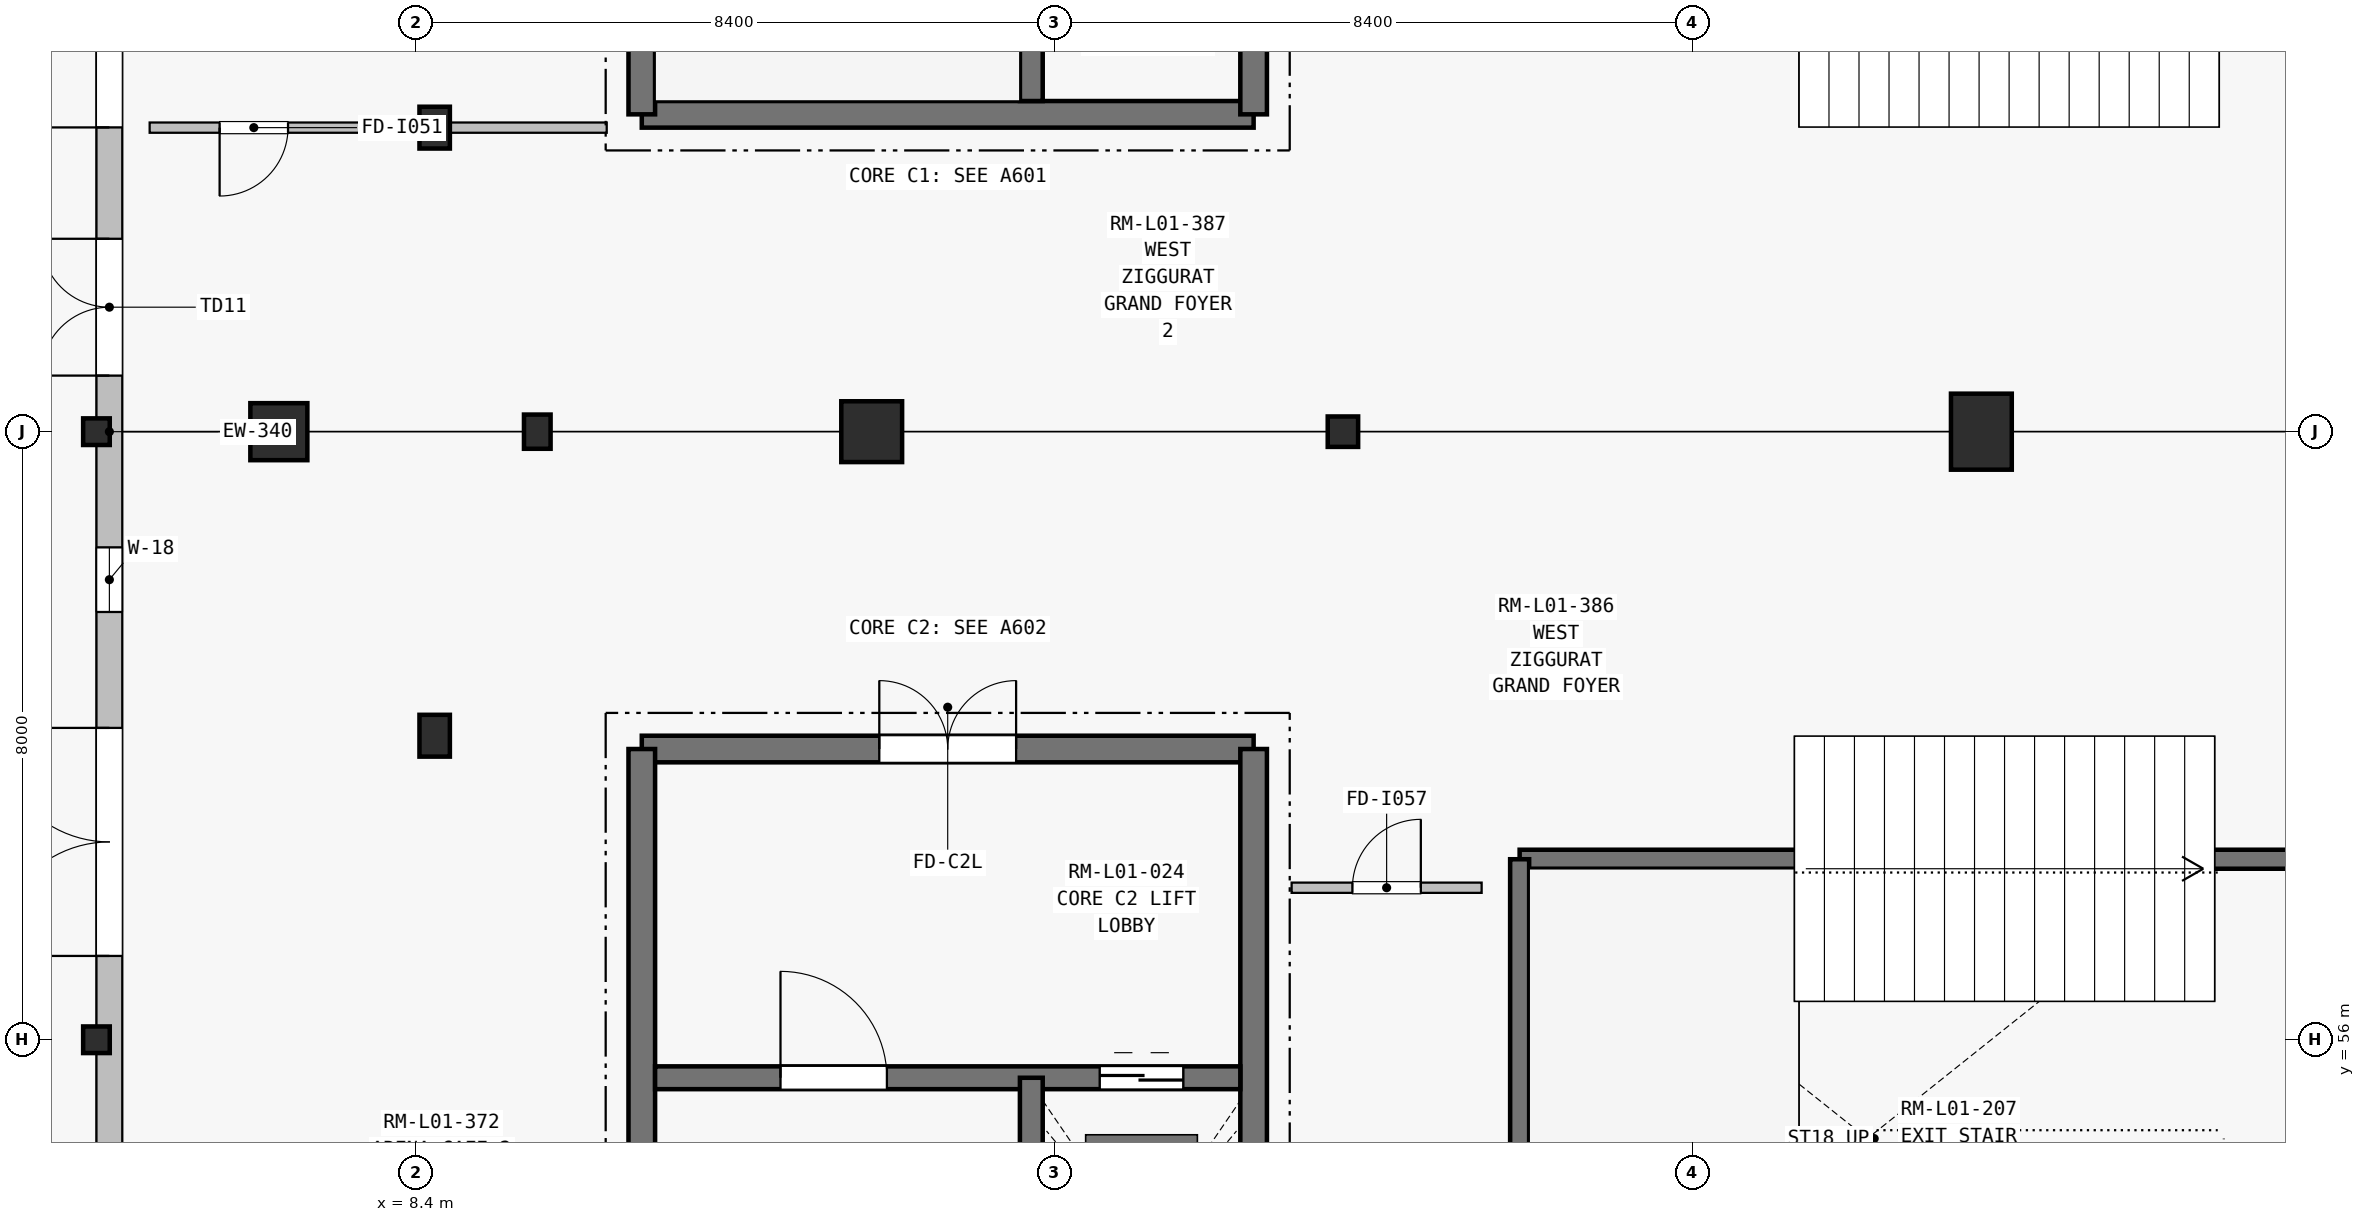
"""IFC4 building model, lengths in metres.
Left out: names, types, materials, properties, quantities, classifications, styles, units other than length and angle.
Written with IfcOpenShell. Run it as: python <this file> out.ifc"""

import sys

from ifc_helpers import new_model, si_unit, direction, frame, frame_2d, origin, origin_2d, place, context, subcontext, project, spatial, rectangle, i_section, extrude, element, fill, save


model = new_model("IFC4")
c1 = context("Model", 3, precision=1e-05, world=origin(), true_north=direction((0.0, 1.0)))
c2 = subcontext(c1, "Body", "Model", "MODEL_VIEW")
j1 = project(units=[si_unit("LENGTHUNIT", "METRE"), si_unit("PLANEANGLEUNIT", "RADIAN")], contexts=[c1])
p1 = place(None, origin())
s1 = spatial("IfcSite", under=j1, at=p1, CompositionType="ELEMENT")
p2 = place(p1, origin())
s2 = spatial("IfcBuilding", under=s1, at=p2, CompositionType="ELEMENT")
p3 = place(p2, frame((0.0, 0.0, 5.4)))
s3 = spatial("IfcBuildingStorey", under=s2, at=p3, CompositionType="ELEMENT", Elevation=5.4)
p4 = place(p3, frame((29.0, 64.0, 0.0), z_axis=(0.0, 0.0, 1.0), x_axis=(-1.0, 0.0, 0.0)))
e1 = element("IfcColumn", 1, at=p4, inside=s3, PredefinedType="COLUMN", context=c2, shape_type="SweptSolid", body=[
    extrude(rectangle(XDim=0.8, YDim=1.0, at=origin_2d()), origin(), (0.0, 0.0, 1.0), 4.5),
])
p5 = place(p3, frame((20.6, 64.0, 0.0), z_axis=(0.0, 0.0, 1.0), x_axis=(-1.0, 0.0, 0.0)))
e2 = element("IfcColumn", 2, at=p5, inside=s3, PredefinedType="COLUMN", context=c2, shape_type="SweptSolid", body=[
    extrude(i_section(OverallWidth=0.4, OverallDepth=0.4, WebThickness=0.018, FlangeThickness=0.032, at=origin_2d()), origin(), (0.0, 0.0, 1.0), 4.5),
])
p6 = place(p3, frame((14.4, 64.0, 0.0), z_axis=(0.0, 0.0, 1.0), x_axis=(-1.0, 0.0, 0.0)))
e3 = element("IfcColumn", 3, at=p6, inside=s3, PredefinedType="COLUMN", context=c2, shape_type="SweptSolid", body=[
    extrude(rectangle(XDim=0.8, YDim=0.8, at=origin_2d()), origin(), (0.0, 0.0, 1.0), 4.5),
])
p7 = place(p3, frame((6.6, 64.0, 0.0), z_axis=(0.0, 0.0, 1.0), x_axis=(-1.0, 0.0, 0.0)))
e4 = element("IfcColumn", 4, at=p7, inside=s3, PredefinedType="COLUMN", context=c2, shape_type="SweptSolid", body=[
    extrude(rectangle(XDim=0.75, YDim=0.75, at=origin_2d()), origin(), (0.0, 0.0, 1.0), 4.25),
])
for number, where, z_axis, x_axis in (
    (5, (4.2, 56.0, 0.0), (0.0, 0.0, 1.0), (1.0, 0.0, 0.0)),
    (6, (4.2, 64.0, 0.0), (0.0, 0.0, 1.0), (1.0, 0.0, 0.0)),
):
    element("IfcColumn", number, at=place(p3, frame(where, z_axis=z_axis, x_axis=x_axis)), inside=s3, PredefinedType="COLUMN", context=c2, shape_type="SweptSolid", body=[
        extrude(i_section(OverallWidth=0.35, OverallDepth=0.35, WebThickness=0.014, FlangeThickness=0.024, at=origin_2d()), origin(), (0.0, 0.0, 1.0), 4.15),
    ])
for number, where, z_axis, x_axis in (
    (7, (8.65, 60.0, 0.0), (0.0, 0.0, 1.0), (1.0, 0.0, 0.0)),
    (8, (8.65, 68.0, 0.0), (0.0, 0.0, 1.0), (1.0, 0.0, 0.0)),
):
    element("IfcColumn", number, at=place(p3, frame(where, z_axis=z_axis, x_axis=x_axis)), inside=s3, PredefinedType="PILASTER", context=c2, shape_type="SweptSolid", body=[
        extrude(rectangle(XDim=0.4, YDim=0.55, at=origin_2d()), origin(), (0.0, 0.0, 1.0), 4.5),
    ])
p8 = place(p3, frame((10.0, 64.0, 0.0), z_axis=(0.0, 0.0, 1.0), x_axis=(-1.0, 0.0, 0.0)))
e9 = element("IfcColumn", 9, at=p8, inside=s3, PredefinedType="PILASTER", context=c2, shape_type="SweptSolid", body=[
    extrude(rectangle(XDim=0.35, YDim=0.45, at=origin_2d()), origin(), (0.0, 0.0, 1.0), 4.5),
])
p9 = place(p3, frame((4.37, 35.803, 0.0), z_axis=(0.0, 0.0, 1.0), x_axis=(0.0, 1.0, 0.0)))
e10 = element("IfcWall", 10, at=p9, inside=s3, PredefinedType="SOLIDWALL", context=c2, shape_type="SweptSolid", body=[
    extrude(rectangle(XDim=56.395, YDim=0.34, at=frame_2d((28.197, 0.0))), origin(), (0.0, 0.0, 1.0), 3.673),
])
p10 = place(p9, frame((7.4, 0.0, 0.0)))
e11 = element("IfcOpeningElement", 11, at=p10, cuts=e10, PredefinedType="OPENING", context=c2, shape_type="SweptSolid", body=[
    extrude(rectangle(XDim=3.0, YDim=2.55, at=frame_2d((1.5, 1.275))), frame((0.0, 0.18, 0.0), z_axis=(0.0, -1.0, 0.0), x_axis=(1.0, 0.0, 0.0)), (0.0, 0.0, 1.0), 0.36),
])
p11 = place(p9, frame((13.6, 0.0, 0.0)))
e12 = element("IfcOpeningElement", 12, at=p11, cuts=e10, PredefinedType="OPENING", context=c2, shape_type="SweptSolid", body=[
    extrude(rectangle(XDim=2.85, YDim=2.5, at=frame_2d((1.425, 1.25))), frame((0.0, 0.18, 0.0), z_axis=(0.0, -1.0, 0.0), x_axis=(1.0, 0.0, 0.0)), (0.0, 0.0, 1.0), 0.36),
])
p12 = place(p9, frame((21.3, 0.0, 0.0)))
e13 = element("IfcOpeningElement", 13, at=p12, cuts=e10, PredefinedType="OPENING", context=c2, shape_type="SweptSolid", body=[
    extrude(rectangle(XDim=3.0, YDim=2.55, at=frame_2d((1.5, 1.275))), frame((0.0, 0.18, 0.0), z_axis=(0.0, -1.0, 0.0), x_axis=(1.0, 0.0, 0.0)), (0.0, 0.0, 1.0), 0.36),
])
p13 = place(p9, frame((32.2, 0.0, 0.0)))
e14 = element("IfcOpeningElement", 14, at=p13, cuts=e10, PredefinedType="OPENING", context=c2, shape_type="SweptSolid", body=[
    extrude(rectangle(XDim=2.85, YDim=2.5, at=frame_2d((1.425, 1.25))), frame((0.0, 0.18, 0.0), z_axis=(0.0, -1.0, 0.0), x_axis=(1.0, 0.0, 0.0)), (0.0, 0.0, 1.0), 0.36),
])
p14 = place(p9, frame((28.935, 0.0, 0.0)))
e15 = element("IfcOpeningElement", 15, at=p14, cuts=e10, PredefinedType="OPENING", context=c2, shape_type="SweptSolid", body=[
    extrude(rectangle(XDim=1.8, YDim=2.35, at=frame_2d((0.9, 1.175))), frame((0.0, 0.18, 0.0), z_axis=(0.0, -1.0, 0.0), x_axis=(1.0, 0.0, 0.0)), (0.0, 0.0, 1.0), 0.36),
])
p15 = place(p9, frame((25.825, 0.0, 0.9)))
e16 = element("IfcOpeningElement", 16, at=p15, cuts=e10, PredefinedType="OPENING", context=c2, shape_type="SweptSolid", body=[
    extrude(rectangle(XDim=0.85, YDim=2.1, at=frame_2d((0.425, 1.05))), frame((0.0, 0.18, 0.0), z_axis=(0.0, -1.0, 0.0), x_axis=(1.0, 0.0, 0.0)), (0.0, 0.0, 1.0), 0.36),
])
p16 = place(p9, frame((39.225, 0.0, 0.75)))
e17 = element("IfcOpeningElement", 17, at=p16, cuts=e10, PredefinedType="OPENING", context=c2, shape_type="SweptSolid", body=[
    extrude(rectangle(XDim=1.65, YDim=2.4, at=frame_2d((0.825, 1.2))), frame((0.0, 0.18, 0.0), z_axis=(0.0, -1.0, 0.0), x_axis=(1.0, 0.0, 0.0)), (0.0, 0.0, 1.0), 0.36),
])
p17 = place(p9, frame((48.65, 0.0, 0.75)))
e18 = element("IfcOpeningElement", 18, at=p17, cuts=e10, PredefinedType="OPENING", context=c2, shape_type="SweptSolid", body=[
    extrude(rectangle(XDim=1.2, YDim=2.2, at=frame_2d((0.6, 1.1))), frame((0.0, 0.18, 0.0), z_axis=(0.0, -1.0, 0.0), x_axis=(1.0, 0.0, 0.0)), (0.0, 0.0, 1.0), 0.36),
])
p18 = place(p3, frame((11.375, 68.175, 0.0), z_axis=(0.0, 0.0, 1.0), x_axis=(1.0, 0.0, 0.0)))
e19 = element("IfcWall", 19, at=p18, inside=s3, PredefinedType="SHEAR", context=c2, shape_type="SweptSolid", body=[
    extrude(rectangle(XDim=8.05, YDim=0.35, at=frame_2d((4.025, 0.0))), origin(), (0.0, 0.0, 1.0), 4.5),
])
p19 = place(p3, frame((11.375, 68.175, 0.0), z_axis=(0.0, 0.0, 1.0), x_axis=(0.0, 1.0, 0.0)))
e20 = element("IfcWall", 20, at=p19, inside=s3, PredefinedType="SHEAR", context=c2, shape_type="SweptSolid", body=[
    extrude(rectangle(XDim=14.85, YDim=0.35, at=frame_2d((7.425, 0.0))), origin(), (0.0, 0.0, 1.0), 4.5),
])
p20 = place(p3, frame((19.425, 68.175, 0.0), z_axis=(0.0, 0.0, 1.0), x_axis=(0.0, 1.0, 0.0)))
e21 = element("IfcWall", 21, at=p20, inside=s3, PredefinedType="SHEAR", context=c2, shape_type="SweptSolid", body=[
    extrude(rectangle(XDim=14.85, YDim=0.35, at=frame_2d((7.425, 0.0))), origin(), (0.0, 0.0, 1.0), 4.5),
])
p21 = place(p20, frame((2.855, 0.0, 0.0)))
e22 = element("IfcOpeningElement", 22, at=p21, cuts=e21, PredefinedType="OPENING", context=c2, shape_type="SweptSolid", body=[
    extrude(rectangle(XDim=0.9, YDim=2.1, at=frame_2d((0.45, 1.05))), frame((0.0, 0.185, 0.0), z_axis=(0.0, -1.0, 0.0), x_axis=(1.0, 0.0, 0.0)), (0.0, 0.0, 1.0), 0.37),
])
p22 = place(p3, frame((16.5, 68.35, 0.0), z_axis=(0.0, 0.0, 1.0), x_axis=(0.0, 1.0, 0.0)))
e23 = element("IfcWall", 23, at=p22, inside=s3, PredefinedType="SHEAR", context=c2, shape_type="SweptSolid", body=[
    extrude(rectangle(XDim=10.35, YDim=0.3, at=frame_2d((5.175, 0.0))), origin(), (0.0, 0.0, 1.0), 4.5),
])
p23 = place(p3, frame((11.375, 59.825, 0.0), z_axis=(0.0, 0.0, 1.0), x_axis=(1.0, 0.0, 0.0)))
e24 = element("IfcWall", 24, at=p23, inside=s3, PredefinedType="SHEAR", context=c2, shape_type="SweptSolid", body=[
    extrude(rectangle(XDim=8.05, YDim=0.35, at=frame_2d((4.025, 0.0))), origin(), (0.0, 0.0, 1.0), 4.5),
])
p24 = place(p23, frame((3.125, 0.0, 0.0)))
e25 = element("IfcOpeningElement", 25, at=p24, cuts=e24, PredefinedType="OPENING", context=c2, shape_type="SweptSolid", body=[
    extrude(rectangle(XDim=1.8, YDim=2.25, at=frame_2d((0.9, 1.125))), frame((0.0, 0.185, 0.0), z_axis=(0.0, -1.0, 0.0), x_axis=(1.0, 0.0, 0.0)), (0.0, 0.0, 1.0), 0.37),
])
p25 = place(p3, frame((11.375, 44.975, 0.0), z_axis=(0.0, 0.0, 1.0), x_axis=(0.0, 1.0, 0.0)))
e26 = element("IfcWall", 26, at=p25, inside=s3, PredefinedType="SHEAR", context=c2, shape_type="SweptSolid", body=[
    extrude(rectangle(XDim=14.85, YDim=0.35, at=frame_2d((7.425, 0.0))), origin(), (0.0, 0.0, 1.0), 4.5),
])
p26 = place(p3, frame((19.425, 44.975, 0.0), z_axis=(0.0, 0.0, 1.0), x_axis=(0.0, 1.0, 0.0)))
e27 = element("IfcWall", 27, at=p26, inside=s3, PredefinedType="SHEAR", context=c2, shape_type="SweptSolid", body=[
    extrude(rectangle(XDim=14.85, YDim=0.35, at=frame_2d((7.425, 0.0))), origin(), (0.0, 0.0, 1.0), 4.5),
])
p27 = place(p26, frame((2.855, 0.0, 0.0)))
e28 = element("IfcOpeningElement", 28, at=p27, cuts=e27, PredefinedType="OPENING", context=c2, shape_type="SweptSolid", body=[
    extrude(rectangle(XDim=0.9, YDim=2.1, at=frame_2d((0.45, 1.05))), frame((0.0, 0.185, 0.0), z_axis=(0.0, -1.0, 0.0), x_axis=(1.0, 0.0, 0.0)), (0.0, 0.0, 1.0), 0.37),
])
p28 = place(p3, frame((11.55, 55.5, 0.0), z_axis=(0.0, 0.0, 1.0), x_axis=(1.0, 0.0, 0.0)))
e29 = element("IfcWall", 29, at=p28, inside=s3, PredefinedType="SHEAR", context=c2, shape_type="SweptSolid", body=[
    extrude(rectangle(XDim=7.7, YDim=0.3, at=frame_2d((3.85, 0.0))), origin(), (0.0, 0.0, 1.0), 4.5),
])
p29 = place(p28, frame((1.65, 0.0, 0.0)))
e30 = element("IfcOpeningElement", 30, at=p29, cuts=e29, PredefinedType="OPENING", context=c2, shape_type="SweptSolid", body=[
    extrude(rectangle(XDim=1.4, YDim=2.2, at=frame_2d((0.7, 1.1))), frame((0.0, 0.16, 0.0), z_axis=(0.0, -1.0, 0.0), x_axis=(1.0, 0.0, 0.0)), (0.0, 0.0, 1.0), 0.32),
])
p30 = place(p28, frame((5.85, 0.0, 0.0)))
e31 = element("IfcOpeningElement", 31, at=p30, cuts=e29, PredefinedType="OPENING", context=c2, shape_type="SweptSolid", body=[
    extrude(rectangle(XDim=1.1, YDim=2.2, at=frame_2d((0.55, 1.1))), frame((0.0, 0.16, 0.0), z_axis=(0.0, -1.0, 0.0), x_axis=(1.0, 0.0, 0.0)), (0.0, 0.0, 1.0), 0.32),
])
p31 = place(p3, frame((16.5, 45.15, 0.0), z_axis=(0.0, 0.0, 1.0), x_axis=(0.0, 1.0, 0.0)))
e32 = element("IfcWall", 32, at=p31, inside=s3, PredefinedType="SHEAR", context=c2, shape_type="SweptSolid", body=[
    extrude(rectangle(XDim=10.35, YDim=0.3, at=frame_2d((5.175, 0.0))), origin(), (0.0, 0.0, 1.0), 4.5),
])
p32 = place(p3, frame((22.925, 58.375, 0.0), z_axis=(0.0, 0.0, 1.0), x_axis=(1.0, 0.0, 0.0)))
e33 = element("IfcWall", 33, at=p32, inside=s3, PredefinedType="SHEAR", context=c2, shape_type="SweptSolid", body=[
    extrude(rectangle(XDim=12.75, YDim=0.25, at=frame_2d((6.375, 0.0))), origin(), (0.0, 0.0, 1.0), 4.5),
])
p33 = place(p3, frame((22.925, 51.025, 0.0), z_axis=(0.0, 0.0, 1.0), x_axis=(0.0, 1.0, 0.0)))
e34 = element("IfcWall", 34, at=p33, inside=s3, PredefinedType="SHEAR", context=c2, shape_type="SweptSolid", body=[
    extrude(rectangle(XDim=7.35, YDim=0.25, at=frame_2d((3.675, 0.0))), origin(), (0.0, 0.0, 1.0), 4.5),
])
p34 = place(p3, frame((10.914, 68.0, 0.0), z_axis=(0.0, 0.0, 1.0), x_axis=(-1.0, 0.0, 0.0)))
e35 = element("IfcWall", 35, at=p34, inside=s3, PredefinedType="PARTITIONING", context=c2, shape_type="SweptSolid", body=[
    extrude(rectangle(XDim=6.014, YDim=0.135, at=frame_2d((3.007, 0.0))), origin(), (0.0, 0.0, 1.0), 4.25),
])
p35 = place(p34, frame((4.193, 0.0, 0.0)))
e36 = element("IfcOpeningElement", 36, at=p35, cuts=e35, PredefinedType="OPENING", context=c2, shape_type="SweptSolid", body=[
    extrude(rectangle(XDim=0.9, YDim=2.1, at=frame_2d((0.45, 1.05))), frame((0.0, 0.077, 0.0), z_axis=(0.0, -1.0, 0.0), x_axis=(1.0, 0.0, 0.0)), (0.0, 0.0, 1.0), 0.155),
])
p36 = place(p3, frame((19.925, 58.0, 0.0), z_axis=(0.0, 0.0, 1.0), x_axis=(1.0, 0.0, 0.0)))
e37 = element("IfcWall", 37, at=p36, inside=s3, PredefinedType="PARTITIONING", context=c2, shape_type="SweptSolid", body=[
    extrude(rectangle(XDim=2.5, YDim=0.135, at=frame_2d((1.25, 0.0))), origin(), (0.0, 0.0, 1.0), 3.505),
])
p37 = place(p36, frame((0.8, 0.0, 0.0)))
e38 = element("IfcOpeningElement", 38, at=p37, cuts=e37, PredefinedType="OPENING", context=c2, shape_type="SweptSolid", body=[
    extrude(rectangle(XDim=0.9, YDim=2.1, at=frame_2d((0.45, 1.05))), frame((0.0, 0.077, 0.0), z_axis=(0.0, -1.0, 0.0), x_axis=(1.0, 0.0, 0.0)), (0.0, 0.0, 1.0), 0.155),
])
p38 = place(p12, origin())
e39 = element("IfcDoor", 39, at=p38, inside=s3, OperationType="DOUBLE_DOOR_SINGLE_SWING", PredefinedType="DOOR", context=c2, shape_type="SweptSolid", body=[
    extrude(rectangle(XDim=3.0, YDim=2.55, at=frame_2d((1.5, 1.275))), frame((0.0, 0.025, 0.0), z_axis=(0.0, -1.0, 0.0), x_axis=(1.0, 0.0, 0.0)), (0.0, 0.0, 1.0), 0.05),
])
fill(e13, e39)
p39 = place(p13, origin())
e40 = element("IfcDoor", 40, at=p39, inside=s3, OperationType="DOUBLE_DOOR_SINGLE_SWING", PredefinedType="DOOR", context=c2, shape_type="SweptSolid", body=[
    extrude(rectangle(XDim=2.85, YDim=2.5, at=frame_2d((1.425, 1.25))), frame((0.0, 0.025, 0.0), z_axis=(0.0, -1.0, 0.0), x_axis=(1.0, 0.0, 0.0)), (0.0, 0.0, 1.0), 0.05),
])
fill(e14, e40)
p40 = place(p14, origin())
e41 = element("IfcDoor", 41, at=p40, inside=s3, OperationType="DOUBLE_DOOR_SINGLE_SWING", PredefinedType="DOOR", context=c2, shape_type="SweptSolid", body=[
    extrude(rectangle(XDim=1.8, YDim=2.35, at=frame_2d((0.9, 1.175))), frame((0.0, 0.025, 0.0), z_axis=(0.0, -1.0, 0.0), x_axis=(1.0, 0.0, 0.0)), (0.0, 0.0, 1.0), 0.05),
])
fill(e15, e41)
p41 = place(p15, origin())
e42 = element("IfcWindow", 42, at=p41, inside=s3, PartitioningType="SINGLE_PANEL", PredefinedType="WINDOW", context=c2, shape_type="SweptSolid", body=[
    extrude(rectangle(XDim=0.85, YDim=2.1, at=frame_2d((0.425, 1.05))), frame((0.0, 0.03, 0.0), z_axis=(0.0, -1.0, 0.0), x_axis=(1.0, 0.0, 0.0)), (0.0, 0.0, 1.0), 0.06),
])
fill(e16, e42)
p42 = place(p24, origin())
e43 = element("IfcDoor", 43, at=p42, inside=s3, OperationType="DOUBLE_DOOR_SINGLE_SWING", PredefinedType="DOOR", context=c2, shape_type="SweptSolid", body=[
    extrude(rectangle(XDim=1.8, YDim=2.25, at=frame_2d((0.9, 1.125))), frame((0.0, 0.025, 0.0), z_axis=(0.0, -1.0, 0.0), x_axis=(1.0, 0.0, 0.0)), (0.0, 0.0, 1.0), 0.05),
])
fill(e25, e43)
p43 = place(p29, origin())
e44 = element("IfcDoor", 44, at=p43, inside=s3, OperationType="SINGLE_SWING_LEFT", PredefinedType="DOOR", context=c2, shape_type="SweptSolid", body=[
    extrude(rectangle(XDim=1.4, YDim=2.2, at=frame_2d((0.7, 1.1))), frame((0.0, 0.025, 0.0), z_axis=(0.0, -1.0, 0.0), x_axis=(1.0, 0.0, 0.0)), (0.0, 0.0, 1.0), 0.05),
])
fill(e30, e44)
p44 = place(p30, origin())
e45 = element("IfcDoor", 45, at=p44, inside=s3, OperationType="SLIDING_TO_LEFT", PredefinedType="DOOR", context=c2, shape_type="SweptSolid", body=[
    extrude(rectangle(XDim=1.1, YDim=2.2, at=frame_2d((0.55, 1.1))), frame((0.0, 0.025, 0.0), z_axis=(0.0, -1.0, 0.0), x_axis=(1.0, 0.0, 0.0)), (0.0, 0.0, 1.0), 0.05),
])
fill(e31, e45)
p45 = place(p35, origin())
e46 = element("IfcDoor", 46, at=p45, inside=s3, OperationType="SINGLE_SWING_RIGHT", PredefinedType="DOOR", context=c2, shape_type="SweptSolid", body=[
    extrude(rectangle(XDim=0.9, YDim=2.1, at=frame_2d((0.45, 1.05))), frame((0.0, 0.025, 0.0), z_axis=(0.0, -1.0, 0.0), x_axis=(1.0, 0.0, 0.0)), (0.0, 0.0, 1.0), 0.05),
])
fill(e36, e46)
p46 = place(p37, origin())
e47 = element("IfcDoor", 47, at=p46, inside=s3, OperationType="SINGLE_SWING_RIGHT", PredefinedType="DOOR", context=c2, shape_type="SweptSolid", body=[
    extrude(rectangle(XDim=0.9, YDim=2.1, at=frame_2d((0.45, 1.05))), frame((0.0, 0.025, 0.0), z_axis=(0.0, -1.0, 0.0), x_axis=(1.0, 0.0, 0.0)), (0.0, 0.0, 1.0), 0.05),
])
fill(e38, e47)
save(model, sys.argv[1])
